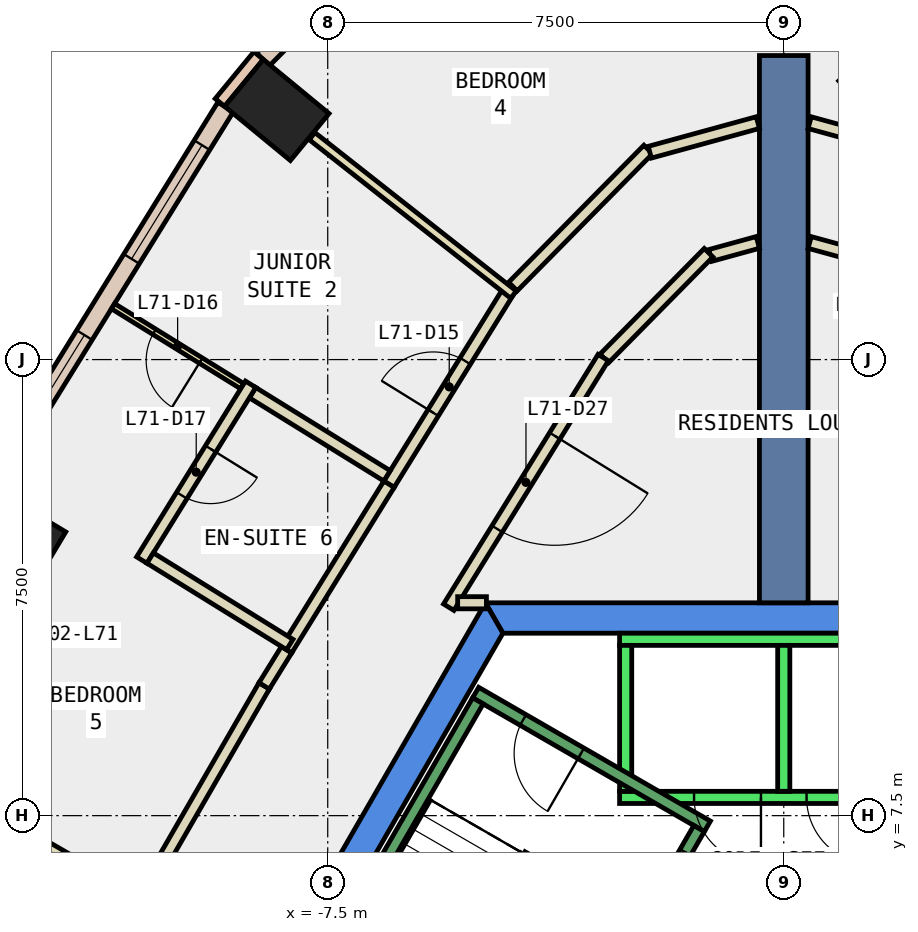
"""IFC4 building model, lengths in metres.
Left out: names, types, materials, properties, quantities, classifications, styles, units other than length and angle.
Written with IfcOpenShell. Run it as: python <this file> out.ifc"""

import sys

from ifc_helpers import new_model, si_unit, direction, frame, frame_2d, origin, origin_2d, place, context, subcontext, project, spatial, polyline, rectangle, outline, extrude, element, fill, save


model = new_model("IFC4")
c1 = context("Model", 3, precision=1e-05, world=origin(), true_north=direction((0.0, 1.0)))
c2 = subcontext(c1, "Body", "Model", "MODEL_VIEW")
j1 = project(units=[si_unit("LENGTHUNIT", "METRE"), si_unit("PLANEANGLEUNIT", "RADIAN")], contexts=[c1])
p1 = place(None, origin())
s1 = spatial("IfcSite", under=j1, at=p1, CompositionType="ELEMENT")
p2 = place(p1, origin())
s2 = spatial("IfcBuilding", under=s1, at=p2, CompositionType="ELEMENT")
p3 = place(p2, frame((0.0, 0.0, 304.4)))
s3 = spatial("IfcBuildingStorey", under=s2, at=p3, CompositionType="ELEMENT", Elevation=304.4)
for number, where, z_axis, x_axis in (
    (1, (-8.337, 19.105, -0.34), (0.0, 0.0, 1.0), (0.636, 0.772, 0.0)),
    (2, (-12.666, 12.097, -0.34), (0.0, 0.0, 1.0), (0.514, 0.858, 0.0)),
):
    element("IfcColumn", number, at=place(p3, frame(where, z_axis=z_axis, x_axis=x_axis)), inside=s3, PredefinedType="COLUMN", context=c2, shape_type="SweptSolid", body=[
        extrude(rectangle(XDim=1.0, YDim=1.4, at=origin_2d()), origin(), (0.0, 0.0, 1.0), 3.6),
    ])
p4 = place(p3, frame((0.0, 0.0, -0.34)))
e3 = element("IfcWall", 3, at=p4, inside=s3, PredefinedType="SHEAR", context=c2, shape_type="SweptSolid", body=[
    extrude(outline(polyline([(4.907, 11.0), (-4.907, 11.0), (-4.619, 10.5), (4.619, 10.5), (4.907, 11.0)])), origin(), (0.0, 0.0, 1.0), 3.6),
])
p5 = place(p3, frame((0.0, 0.0, -0.34)))
e4 = element("IfcWall", 4, at=p5, inside=s3, PredefinedType="SHEAR", context=c2, shape_type="SweptSolid", body=[
    extrude(outline(polyline([(-9.236, 3.502), (-8.803, 3.253), (-4.619, 10.5), (-4.907, 11.0), (-9.236, 3.502)])), origin(), (0.0, 0.0, 1.0), 3.6),
])
p6 = place(p3, frame((0.0, 11.0, -0.34), z_axis=(0.0, 0.0, 1.0), x_axis=(0.0, 1.0, 0.0)))
e5 = element("IfcWall", 5, at=p6, inside=s3, PredefinedType="SHEAR", context=c2, shape_type="SweptSolid", body=[
    extrude(rectangle(XDim=9.0, YDim=0.8, at=frame_2d((4.5, 0.0))), origin(), (0.0, 0.0, 1.0), 3.6),
])
p7 = place(p3, frame((-8.637, 19.999, 0.0), z_axis=(0.0, 0.0, 1.0), x_axis=(-0.635852688617, -0.771810441999, 0.0)))
e6 = element("IfcWall", 6, at=p7, inside=s3, PredefinedType="STANDARD", context=c2, shape_type="SweptSolid", body=[
    extrude(rectangle(XDim=1.0, YDim=0.2, at=frame_2d((0.5, 0.0))), origin(), (0.0, 0.0, 1.0), 3.26),
])
p8 = place(p3, frame((-5.572, 22.969, 0.0), z_axis=(0.0, 0.0, 1.0), x_axis=(-0.70250598769, -0.711677832491, 0.0)))
e7 = element("IfcWall", 7, at=p8, inside=s3, PredefinedType="STANDARD", context=c2, shape_type="SweptSolid", body=[
    extrude(rectangle(XDim=4.259, YDim=0.3, at=frame_2d((2.129, 0.0))), origin(), (0.0, 0.0, 1.0), 3.26),
])
p9 = place(p8, frame((1.429, 0.0, 0.9)))
e8 = element("IfcOpeningElement", 8, at=p9, cuts=e7, PredefinedType="OPENING", context=c2, shape_type="SweptSolid", body=[
    extrude(rectangle(XDim=1.4, YDim=2.0, at=frame_2d((0.7, 1.0))), frame((0.0, 0.16, 0.0), z_axis=(0.0, -1.0, 0.0), x_axis=(1.0, 0.0, 0.0)), (0.0, 0.0, 1.0), 0.32),
])
p10 = place(p3, frame((-9.18, 19.153, 0.0), z_axis=(0.0, 0.0, 1.0), x_axis=(-0.526409529565, -0.850231149267, 0.0)))
e9 = element("IfcWall", 9, at=p10, inside=s3, PredefinedType="STANDARD", context=c2, shape_type="SweptSolid", body=[
    extrude(rectangle(XDim=7.346, YDim=0.3, at=frame_2d((3.673, 0.0))), origin(), (0.0, 0.0, 1.0), 3.26),
])
p11 = place(p10, frame((0.737, 0.0, 0.9)))
e10 = element("IfcOpeningElement", 10, at=p11, cuts=e9, PredefinedType="OPENING", context=c2, shape_type="SweptSolid", body=[
    extrude(rectangle(XDim=2.2, YDim=2.0, at=frame_2d((1.1, 1.0))), frame((0.0, 0.16, 0.0), z_axis=(0.0, -1.0, 0.0), x_axis=(1.0, 0.0, 0.0)), (0.0, 0.0, 1.0), 0.32),
])
p12 = place(p10, frame((4.41, 0.0, 0.9)))
e11 = element("IfcOpeningElement", 11, at=p12, cuts=e9, PredefinedType="OPENING", context=c2, shape_type="SweptSolid", body=[
    extrude(rectangle(XDim=2.2, YDim=2.0, at=frame_2d((1.1, 1.0))), frame((0.0, 0.16, 0.0), z_axis=(0.0, -1.0, 0.0), x_axis=(1.0, 0.0, 0.0)), (0.0, 0.0, 1.0), 0.32),
])
p13 = place(p3, frame((1.209, 16.712, 0.0), z_axis=(0.0, 0.0, 1.0), x_axis=(-0.964583129746, 0.26377904733, 0.0)))
e12 = element("IfcWall", 12, at=p13, inside=s3, PredefinedType="PARTITIONING", context=c2, shape_type="SweptSolid", body=[
    extrude(rectangle(XDim=0.812, YDim=0.2, at=frame_2d((0.406, 0.0))), origin(), (0.0, 0.0, 1.0), 3.26),
])
p14 = place(p3, frame((-0.426, 16.927, 0.0), z_axis=(0.0, 0.0, 1.0), x_axis=(-0.964276465753, -0.264897900321, 0.0)))
e13 = element("IfcWall", 13, at=p14, inside=s3, PredefinedType="PARTITIONING", context=c2, shape_type="SweptSolid", body=[
    extrude(rectangle(XDim=0.812, YDim=0.2, at=frame_2d((0.406, 0.0))), origin(), (0.0, 0.0, 1.0), 3.26),
])
p15 = place(p3, frame((-1.236, 16.757, 0.0), z_axis=(0.0, 0.0, 1.0), x_axis=(-0.702341227034, -0.711840432126, 0.0)))
e14 = element("IfcWall", 14, at=p15, inside=s3, PredefinedType="PARTITIONING", context=c2, shape_type="SweptSolid", body=[
    extrude(rectangle(XDim=2.442, YDim=0.2, at=frame_2d((1.221, 0.0))), origin(), (0.0, 0.0, 1.0), 3.26),
])
p16 = place(p3, frame((-2.969, 15.033, 0.0), z_axis=(0.0, 0.0, 1.0), x_axis=(-0.526330241425, -0.85028023437, 0.0)))
e15 = element("IfcWall", 15, at=p16, inside=s3, PredefinedType="PARTITIONING", context=c2, shape_type="SweptSolid", body=[
    extrude(rectangle(XDim=4.828, YDim=0.2, at=frame_2d((2.414, 0.0))), origin(), (0.0, 0.0, 1.0), 3.26),
])
p17 = place(p16, frame((1.514, 0.0, 0.0)))
e16 = element("IfcOpeningElement", 16, at=p17, cuts=e15, PredefinedType="OPENING", context=c2, shape_type="SweptSolid", body=[
    extrude(rectangle(XDim=1.8, YDim=2.1, at=frame_2d((0.9, 1.05))), frame((0.0, 0.11, 0.0), z_axis=(0.0, -1.0, 0.0), x_axis=(1.0, 0.0, 0.0)), (0.0, 0.0, 1.0), 0.22),
])
p18 = place(p3, frame((-5.363, 11.001, 0.0), z_axis=(0.0, 0.0, 1.0), x_axis=(1.0, 0.0, 0.0)))
e17 = element("IfcWall", 17, at=p18, inside=s3, PredefinedType="PARTITIONING", context=c2, shape_type="SweptSolid", body=[
    extrude(rectangle(XDim=0.473, YDim=0.2, at=frame_2d((0.237, 0.0))), origin(), (0.0, 0.0, 1.0), 3.26),
])
p19 = place(p3, frame((-4.454, 16.201, 0.0), z_axis=(0.0, 0.0, 1.0), x_axis=(0.702505657511, 0.711678158415, 0.0)))
e18 = element("IfcWall", 18, at=p19, inside=s3, PredefinedType="PARTITIONING", context=c2, shape_type="SweptSolid", body=[
    extrude(rectangle(XDim=3.167, YDim=0.2, at=frame_2d((1.584, 0.0))), origin(), (0.0, 0.0, 1.0), 3.26),
])
p20 = place(p3, frame((-2.203, 18.41, 0.0), z_axis=(0.0, 0.0, 1.0), x_axis=(0.964423583418, 0.264361781934, 0.0)))
e19 = element("IfcWall", 19, at=p20, inside=s3, PredefinedType="PARTITIONING", context=c2, shape_type="SweptSolid", body=[
    extrude(rectangle(XDim=1.842, YDim=0.2, at=frame_2d((0.921, 0.0))), origin(), (0.0, 0.0, 1.0), 3.26),
])
p21 = place(p3, frame((0.426, 18.896, 0.0), z_axis=(0.0, 0.0, 1.0), x_axis=(0.964522741234, -0.263999775838, 0.0)))
e20 = element("IfcWall", 20, at=p21, inside=s3, PredefinedType="PARTITIONING", context=c2, shape_type="SweptSolid", body=[
    extrude(rectangle(XDim=1.943, YDim=0.2, at=frame_2d((0.971, 0.0))), origin(), (0.0, 0.0, 1.0), 3.26),
])
p22 = place(p3, frame((-6.493, 12.95, 0.0), z_axis=(0.0, 0.0, 1.0), x_axis=(0.526432748426, 0.850216773173, 0.0)))
e21 = element("IfcWall", 21, at=p22, inside=s3, PredefinedType="PARTITIONING", context=c2, shape_type="SweptSolid", body=[
    extrude(rectangle(XDim=3.765, YDim=0.2, at=frame_2d((1.882, 0.0))), origin(), (0.0, 0.0, 1.0), 3.26),
])
p23 = place(p22, frame((1.383, 0.0, 0.0)))
e22 = element("IfcOpeningElement", 22, at=p23, cuts=e21, PredefinedType="OPENING", context=c2, shape_type="SweptSolid", body=[
    extrude(rectangle(XDim=1.0, YDim=2.1, at=frame_2d((0.5, 1.05))), frame((0.0, 0.11, 0.0), z_axis=(0.0, -1.0, 0.0), x_axis=(1.0, 0.0, 0.0)), (0.0, 0.0, 1.0), 0.22),
])
p24 = place(p3, frame((-10.543, 6.174, 0.0), z_axis=(0.0, 0.0, 1.0), x_axis=(0.50008212199, 0.86597798544, 0.0)))
e23 = element("IfcWall", 23, at=p24, inside=s3, PredefinedType="PARTITIONING", context=c2, shape_type="SweptSolid", body=[
    extrude(rectangle(XDim=3.995, YDim=0.2, at=frame_2d((1.998, 0.0))), origin(), (0.0, 0.0, 1.0), 3.26),
])
p25 = place(p3, frame((-8.545, 9.634, 0.0), z_axis=(0.0, 0.0, 1.0), x_axis=(0.52594604986, 0.85051793199, 0.0)))
e24 = element("IfcWall", 24, at=p25, inside=s3, PredefinedType="PARTITIONING", context=c2, shape_type="SweptSolid", body=[
    extrude(rectangle(XDim=0.699, YDim=0.2, at=frame_2d((0.35, 0.0))), origin(), (0.0, 0.0, 1.0), 3.26),
])
p26 = place(p3, frame((-8.177, 10.229, 0.0), z_axis=(0.0, 0.0, 1.0), x_axis=(0.526504295939, 0.850172468595, 0.0)))
e25 = element("IfcWall", 25, at=p26, inside=s3, PredefinedType="PARTITIONING", context=c2, shape_type="SweptSolid", body=[
    extrude(rectangle(XDim=3.2, YDim=0.2, at=frame_2d((1.6, 0.0))), origin(), (0.0, 0.0, 1.0), 3.26),
])
p27 = place(p3, frame((-4.445, 16.068, 0.0), z_axis=(0.0, 0.0, 1.0), x_axis=(-0.785872006963, 0.618389188677, 0.0)))
e26 = element("IfcWall", 26, at=p27, inside=s3, PredefinedType="PARTITIONING", context=c2, shape_type="SweptSolid", body=[
    extrude(rectangle(XDim=4.216, YDim=0.15, at=frame_2d((2.108, 0.0))), origin(), (0.0, 0.0, 1.0), 3.26),
])
p28 = place(p3, frame((-8.906, 14.562, 0.0), z_axis=(0.0, 0.0, 1.0), x_axis=(-0.850186034224, 0.526482390219, 0.0)))
e27 = element("IfcWall", 27, at=p28, inside=s3, PredefinedType="PARTITIONING", context=c2, shape_type="SweptSolid", body=[
    extrude(rectangle(XDim=2.5, YDim=0.1, at=frame_2d((1.25, 0.0))), origin(), (0.0, 0.0, 1.0), 3.26),
])
p29 = place(p28, frame((0.8, 0.0, 0.0)))
e28 = element("IfcOpeningElement", 28, at=p29, cuts=e27, PredefinedType="OPENING", context=c2, shape_type="SweptSolid", body=[
    extrude(rectangle(XDim=0.9, YDim=2.1, at=frame_2d((0.45, 1.05))), frame((0.0, 0.06, 0.0), z_axis=(0.0, -1.0, 0.0), x_axis=(1.0, 0.0, 0.0)), (0.0, 0.0, 1.0), 0.12),
])
p30 = place(p3, frame((-6.525, 13.088, 0.0), z_axis=(0.0, 0.0, 1.0), x_axis=(-0.850379182329, 0.526170358592, 0.0)))
e29 = element("IfcWall", 29, at=p30, inside=s3, PredefinedType="PARTITIONING", context=c2, shape_type="SweptSolid", body=[
    extrude(rectangle(XDim=2.6, YDim=0.2, at=frame_2d((1.3, 0.0))), origin(), (0.0, 0.0, 1.0), 3.26),
])
p31 = place(p3, frame((-8.768, 14.594, 0.0), z_axis=(0.0, 0.0, 1.0), x_axis=(-0.526418877713, -0.850225361412, 0.0)))
e30 = element("IfcWall", 30, at=p31, inside=s3, PredefinedType="PARTITIONING", context=c2, shape_type="SweptSolid", body=[
    extrude(rectangle(XDim=3.4, YDim=0.2, at=frame_2d((1.7, 0.0))), origin(), (0.0, 0.0, 1.0), 3.26),
])
p32 = place(p31, frame((1.25, 0.0, 0.0)))
e31 = element("IfcOpeningElement", 31, at=p32, cuts=e30, PredefinedType="OPENING", context=c2, shape_type="SweptSolid", body=[
    extrude(rectangle(XDim=0.9, YDim=2.1, at=frame_2d((0.45, 1.05))), frame((0.0, 0.11, 0.0), z_axis=(0.0, -1.0, 0.0), x_axis=(1.0, 0.0, 0.0)), (0.0, 0.0, 1.0), 0.22),
])
p33 = place(p3, frame((-10.42, 11.736, 0.0), z_axis=(0.0, 0.0, 1.0), x_axis=(0.850124477172, -0.52658178217, 0.0)))
e32 = element("IfcWall", 32, at=p33, inside=s3, PredefinedType="PARTITIONING", context=c2, shape_type="SweptSolid", body=[
    extrude(rectangle(XDim=2.701, YDim=0.2, at=frame_2d((1.35, 0.0))), origin(), (0.0, 0.0, 1.0), 3.26),
])
p34 = place(p3, frame((-10.494, 6.059, 0.0), z_axis=(0.0, 0.0, 1.0), x_axis=(-0.866027397988, 0.499996545922, 0.0)))
e33 = element("IfcWall", 33, at=p34, inside=s3, PredefinedType="PARTITIONING", context=c2, shape_type="SweptSolid", body=[
    extrude(rectangle(XDim=5.5, YDim=0.15, at=frame_2d((2.75, 0.0))), origin(), (0.0, 0.0, 1.0), 3.26),
])
p35 = place(p3, frame((2.7, 7.8, 0.0), z_axis=(0.0, 0.0, 1.0), x_axis=(-1.0, 0.0, 0.0)))
e34 = element("IfcWall", 34, at=p35, inside=s3, PredefinedType="STANDARD", context=c2, shape_type="SweptSolid", body=[
    extrude(rectangle(XDim=5.4, YDim=0.2, at=frame_2d((2.7, 0.0))), origin(), (0.0, 0.0, 1.0), 3.26),
])
p36 = place(p35, frame((1.225, 0.0, 0.0)))
e35 = element("IfcOpeningElement", 35, at=p36, cuts=e34, PredefinedType="OPENING", context=c2, shape_type="SweptSolid", body=[
    extrude(rectangle(XDim=1.1, YDim=2.1, at=frame_2d((0.55, 1.05))), frame((0.0, 0.11, 0.0), z_axis=(0.0, -1.0, 0.0), x_axis=(1.0, 0.0, 0.0)), (0.0, 0.0, 1.0), 0.22),
])
p37 = place(p35, frame((3.075, 0.0, 0.0)))
e36 = element("IfcOpeningElement", 36, at=p37, cuts=e34, PredefinedType="OPENING", context=c2, shape_type="SweptSolid", body=[
    extrude(rectangle(XDim=1.1, YDim=2.1, at=frame_2d((0.55, 1.05))), frame((0.0, 0.11, 0.0), z_axis=(0.0, -1.0, 0.0), x_axis=(1.0, 0.0, 0.0)), (0.0, 0.0, 1.0), 0.22),
])
p38 = place(p3, frame((2.7, 10.4, 0.0), z_axis=(0.0, 0.0, 1.0), x_axis=(-1.0, 0.0, 0.0)))
e37 = element("IfcWall", 37, at=p38, inside=s3, PredefinedType="STANDARD", context=c2, shape_type="SweptSolid", body=[
    extrude(rectangle(XDim=5.4, YDim=0.2, at=frame_2d((2.7, 0.0))), origin(), (0.0, 0.0, 1.0), 3.26),
])
for number, where, z_axis, x_axis in (
    (38, (0.0, 7.9, 0.0), (0.0, 0.0, 1.0), (0.0, 1.0, 0.0)),
    (39, (-2.6, 7.9, 0.0), (0.0, 0.0, 1.0), (0.0, 1.0, 0.0)),
):
    element("IfcWall", number, at=place(p3, frame(where, z_axis=z_axis, x_axis=x_axis)), inside=s3, PredefinedType="STANDARD", context=c2, shape_type="SweptSolid", body=[
        extrude(rectangle(XDim=2.4, YDim=0.2, at=frame_2d((1.2, 0.0))), origin(), (0.0, 0.0, 1.0), 3.26),
    ])
p39 = place(p3, frame((-1.256, 7.324, 0.0), z_axis=(0.0, 0.0, 1.0), x_axis=(-0.866046073146, 0.499964197906, 0.0)))
e40 = element("IfcWall", 40, at=p39, inside=s3, PredefinedType="STANDARD", context=c2, shape_type="SweptSolid", body=[
    extrude(rectangle(XDim=4.4, YDim=0.2, at=frame_2d((2.2, 0.0))), origin(), (0.0, 0.0, 1.0), 3.26),
])
p40 = place(p39, frame((2.4, 0.0, 0.0)))
e41 = element("IfcOpeningElement", 41, at=p40, cuts=e40, PredefinedType="OPENING", context=c2, shape_type="SweptSolid", body=[
    extrude(rectangle(XDim=1.1, YDim=2.2, at=frame_2d((0.55, 1.1))), frame((0.0, 0.11, 0.0), z_axis=(0.0, -1.0, 0.0), x_axis=(1.0, 0.0, 0.0)), (0.0, 0.0, 1.0), 0.22),
])
p41 = place(p3, frame((-1.393, 7.288, 0.0), z_axis=(0.0, 0.0, 1.0), x_axis=(-0.499963383562, -0.866046543262, 0.0)))
e42 = element("IfcWall", 42, at=p41, inside=s3, PredefinedType="STANDARD", context=c2, shape_type="SweptSolid", body=[
    extrude(rectangle(XDim=6.9, YDim=0.2, at=frame_2d((3.45, 0.0))), origin(), (0.0, 0.0, 1.0), 3.26),
])
p42 = place(p41, frame((0.45, 0.0, 0.0)))
e43 = element("IfcOpeningElement", 43, at=p42, cuts=e42, PredefinedType="OPENING", context=c2, shape_type="SweptSolid", body=[
    extrude(rectangle(XDim=1.1, YDim=2.2, at=frame_2d((0.55, 1.1))), frame((0.0, 0.11, 0.0), z_axis=(0.0, -1.0, 0.0), x_axis=(1.0, 0.0, 0.0)), (0.0, 0.0, 1.0), 0.22),
])
p43 = place(p3, frame((-5.03, 9.388, 0.0), z_axis=(0.0, 0.0, 1.0), x_axis=(-0.499978703459, -0.866037698999, 0.0)))
e44 = element("IfcWall", 44, at=p43, inside=s3, PredefinedType="STANDARD", context=c2, shape_type="SweptSolid", body=[
    extrude(rectangle(XDim=6.9, YDim=0.2, at=frame_2d((3.45, 0.0))), origin(), (0.0, 0.0, 1.0), 3.26),
])
p44 = place(p11, origin())
e45 = element("IfcWindow", 45, at=p44, inside=s3, PartitioningType="SINGLE_PANEL", PredefinedType="WINDOW", context=c2, shape_type="SweptSolid", body=[
    extrude(rectangle(XDim=2.2, YDim=2.0, at=frame_2d((1.1, 1.0))), frame((0.0, 0.03, 0.0), z_axis=(0.0, -1.0, 0.0), x_axis=(1.0, 0.0, 0.0)), (0.0, 0.0, 1.0), 0.06),
])
fill(e10, e45)
p45 = place(p12, origin())
e46 = element("IfcWindow", 46, at=p45, inside=s3, PartitioningType="SINGLE_PANEL", PredefinedType="WINDOW", context=c2, shape_type="SweptSolid", body=[
    extrude(rectangle(XDim=2.2, YDim=2.0, at=frame_2d((1.1, 1.0))), frame((0.0, 0.03, 0.0), z_axis=(0.0, -1.0, 0.0), x_axis=(1.0, 0.0, 0.0)), (0.0, 0.0, 1.0), 0.06),
])
fill(e11, e46)
p46 = place(p23, origin())
e47 = element("IfcDoor", 47, at=p46, inside=s3, OperationType="SINGLE_SWING_LEFT", PredefinedType="DOOR", context=c2, shape_type="SweptSolid", body=[
    extrude(rectangle(XDim=1.0, YDim=2.1, at=frame_2d((0.5, 1.05))), frame((0.0, 0.025, 0.0), z_axis=(0.0, -1.0, 0.0), x_axis=(1.0, 0.0, 0.0)), (0.0, 0.0, 1.0), 0.05),
])
fill(e22, e47)
p47 = place(p29, origin())
e48 = element("IfcDoor", 48, at=p47, inside=s3, OperationType="SINGLE_SWING_LEFT", PredefinedType="DOOR", context=c2, shape_type="SweptSolid", body=[
    extrude(rectangle(XDim=0.9, YDim=2.1, at=frame_2d((0.45, 1.05))), frame((0.0, 0.025, 0.0), z_axis=(0.0, -1.0, 0.0), x_axis=(1.0, 0.0, 0.0)), (0.0, 0.0, 1.0), 0.05),
])
fill(e28, e48)
p48 = place(p32, origin())
e49 = element("IfcDoor", 49, at=p48, inside=s3, OperationType="SINGLE_SWING_LEFT", PredefinedType="DOOR", context=c2, shape_type="SweptSolid", body=[
    extrude(rectangle(XDim=0.9, YDim=2.1, at=frame_2d((0.45, 1.05))), frame((0.0, 0.025, 0.0), z_axis=(0.0, -1.0, 0.0), x_axis=(1.0, 0.0, 0.0)), (0.0, 0.0, 1.0), 0.05),
])
fill(e31, e49)
p49 = place(p17, origin())
e50 = element("IfcDoor", 50, at=p49, inside=s3, OperationType="DOUBLE_DOOR_SINGLE_SWING", PredefinedType="DOOR", context=c2, shape_type="SweptSolid", body=[
    extrude(rectangle(XDim=1.8, YDim=2.1, at=frame_2d((0.9, 1.05))), frame((0.0, 0.025, 0.0), z_axis=(0.0, -1.0, 0.0), x_axis=(1.0, 0.0, 0.0)), (0.0, 0.0, 1.0), 0.05),
])
fill(e16, e50)
p50 = place(p36, origin())
e51 = element("IfcDoor", 51, at=p50, inside=s3, OperationType="SLIDING_TO_LEFT", PredefinedType="DOOR", context=c2, shape_type="SweptSolid", body=[
    extrude(rectangle(XDim=1.1, YDim=2.1, at=frame_2d((0.55, 1.05))), frame((0.0, 0.025, 0.0), z_axis=(0.0, -1.0, 0.0), x_axis=(1.0, 0.0, 0.0)), (0.0, 0.0, 1.0), 0.05),
])
fill(e35, e51)
p51 = place(p37, origin())
e52 = element("IfcDoor", 52, at=p51, inside=s3, OperationType="SLIDING_TO_LEFT", PredefinedType="DOOR", context=c2, shape_type="SweptSolid", body=[
    extrude(rectangle(XDim=1.1, YDim=2.1, at=frame_2d((0.55, 1.05))), frame((0.0, 0.025, 0.0), z_axis=(0.0, -1.0, 0.0), x_axis=(1.0, 0.0, 0.0)), (0.0, 0.0, 1.0), 0.05),
])
fill(e36, e52)
p52 = place(p42, origin())
e53 = element("IfcDoor", 53, at=p52, inside=s3, OperationType="SINGLE_SWING_LEFT", PredefinedType="DOOR", context=c2, shape_type="SweptSolid", body=[
    extrude(rectangle(XDim=1.1, YDim=2.2, at=frame_2d((0.55, 1.1))), frame((0.0, 0.025, 0.0), z_axis=(0.0, -1.0, 0.0), x_axis=(1.0, 0.0, 0.0)), (0.0, 0.0, 1.0), 0.05),
])
fill(e43, e53)
p53 = place(p40, origin())
e54 = element("IfcDoor", 54, at=p53, inside=s3, OperationType="SINGLE_SWING_LEFT", PredefinedType="DOOR", context=c2, shape_type="SweptSolid", body=[
    extrude(rectangle(XDim=1.1, YDim=2.2, at=frame_2d((0.55, 1.1))), frame((0.0, 0.025, 0.0), z_axis=(0.0, -1.0, 0.0), x_axis=(1.0, 0.0, 0.0)), (0.0, 0.0, 1.0), 0.05),
])
fill(e41, e54)
save(model, sys.argv[1])
